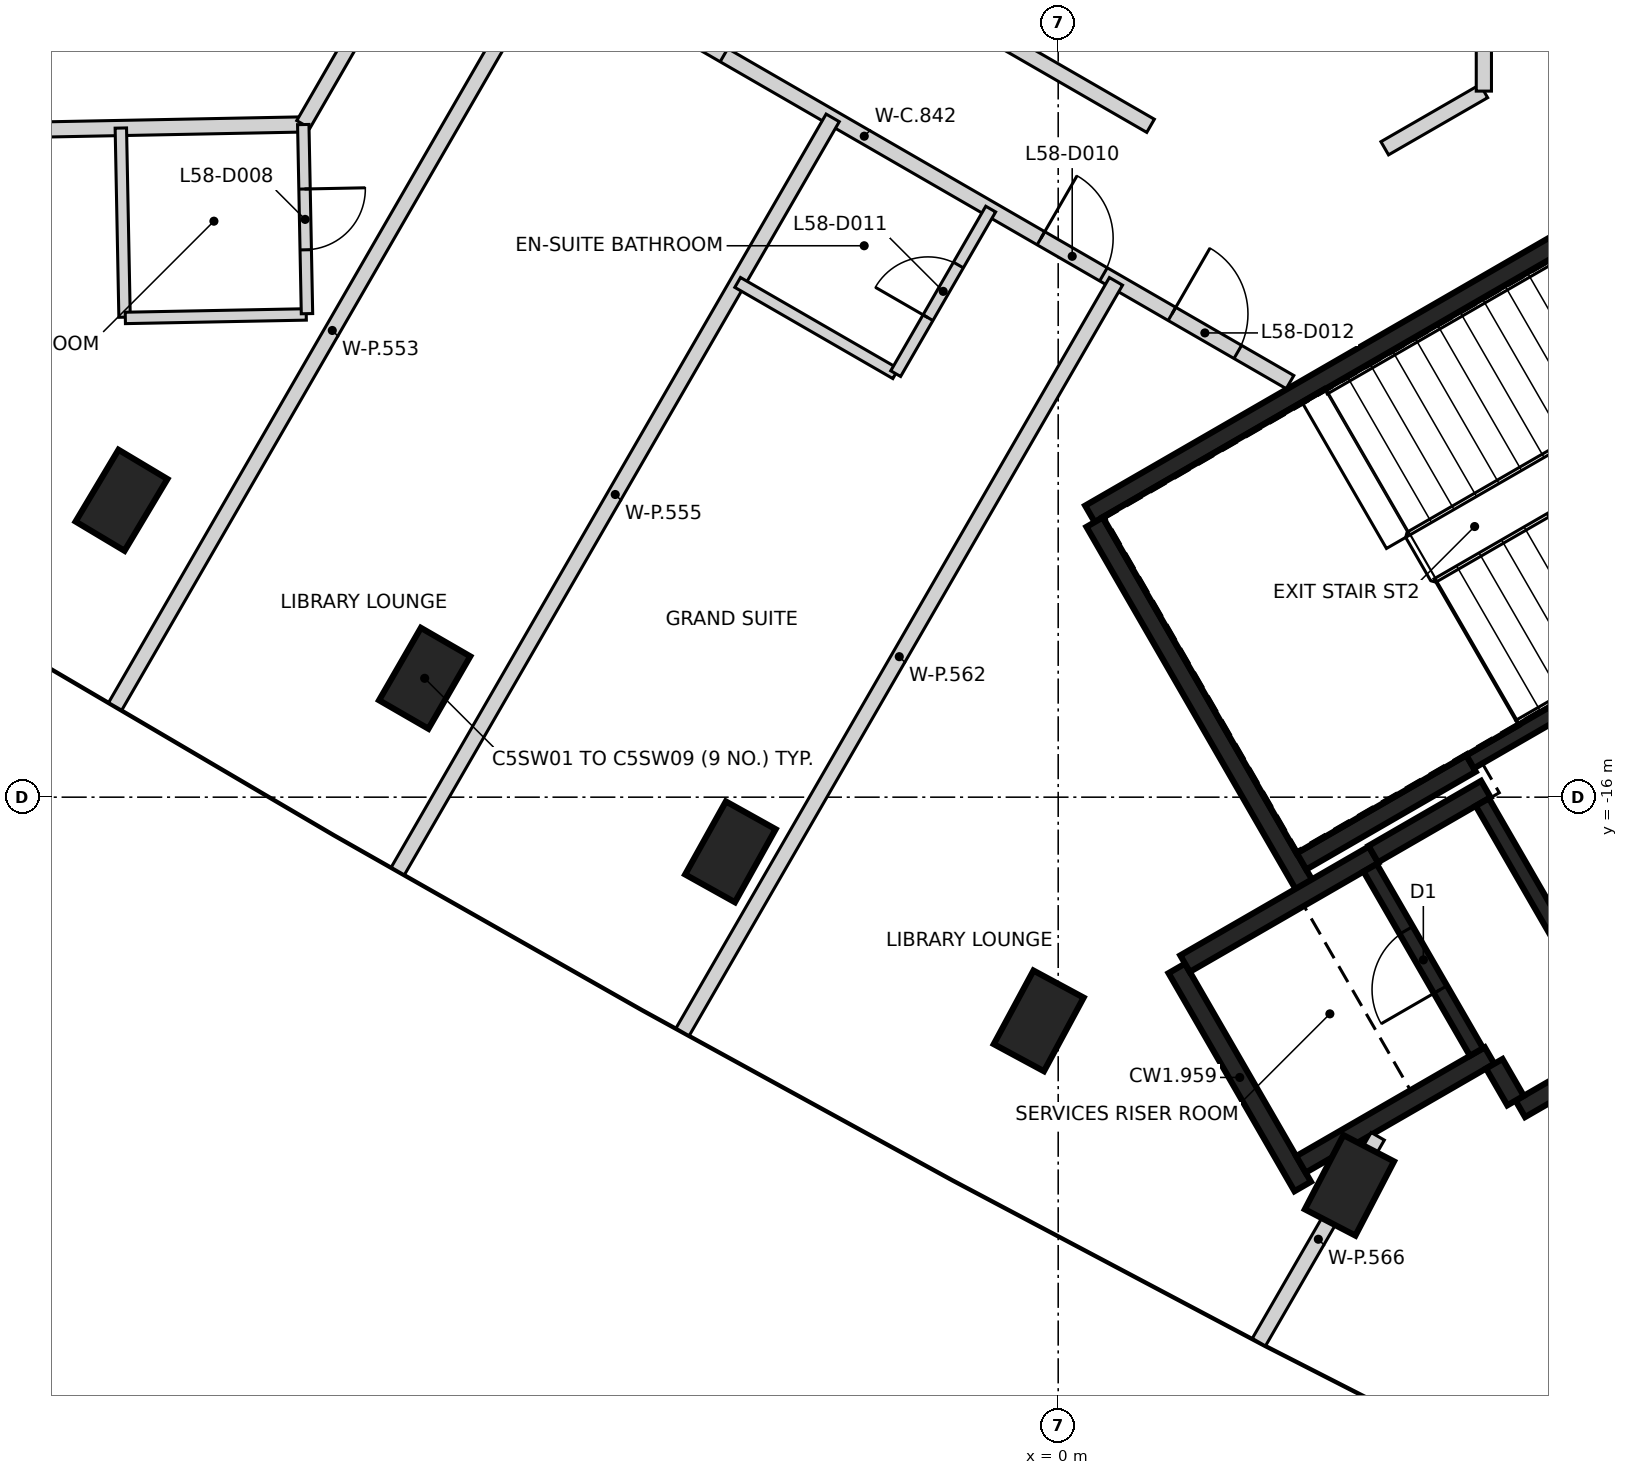
"""IFC4 building model, lengths in metres.
Left out: names, types, materials, properties, quantities, classifications, styles, units other than length and angle.
Written with IfcOpenShell. Run it as: python <this file> out.ifc"""

import sys

from ifc_helpers import new_model, si_unit, direction, frame, frame_2d, origin, origin_2d, place, context, subcontext, project, spatial, rectangle, extrude, element, fill, save


model = new_model("IFC4")
c1 = context("Model", 3, precision=1e-05, world=origin(), true_north=direction((0.0, 1.0)))
c2 = subcontext(c1, "Body", "Model", "MODEL_VIEW")
j1 = project(units=[si_unit("LENGTHUNIT", "METRE"), si_unit("PLANEANGLEUNIT", "RADIAN")], contexts=[c1])
p1 = place(None, origin())
s1 = spatial("IfcSite", under=j1, at=p1, CompositionType="ELEMENT")
p2 = place(p1, origin())
s2 = spatial("IfcBuilding", under=s1, at=p2, CompositionType="ELEMENT")
p3 = place(p2, frame((0.0, 0.0, 232.2)))
s3 = spatial("IfcBuildingStorey", under=s2, at=p3, CompositionType="ELEMENT", Elevation=232.2)
for number, where, z_axis, x_axis in (
    (1, (-12.323, -12.094, -0.35), (0.0, 0.0, 1.0), (0.513, 0.858, 0.0)),
    (2, (-8.335, -14.436, -0.35), (0.0, 0.0, 1.0), (0.5, 0.866, 0.0)),
    (3, (-4.312, -16.719, -0.35), (0.0, 0.0, 1.0), (0.487, 0.873, 0.0)),
    (4, (-0.256, -18.943, -0.35), (0.0, 0.0, 1.0), (0.475, 0.88, 0.0)),
    (5, (3.832, -21.107, -0.35), (0.0, 0.0, 1.0), (0.461, 0.887, 0.0)),
):
    element("IfcColumn", number, at=place(p3, frame(where, z_axis=z_axis, x_axis=x_axis)), inside=s3, PredefinedType="COLUMN", context=c2, shape_type="SweptSolid", body=[
        extrude(rectangle(XDim=1.1, YDim=0.75, at=origin_2d()), origin(), (0.0, 0.0, 1.0), 3.6),
    ])
p4 = place(p3, frame((0.417, -12.273, 0.0), z_axis=(0.0, 0.0, 1.0), x_axis=(0.866021906294, 0.500006057782, 0.0)))
e6 = element("IfcWall", 6, at=p4, inside=s3, PredefinedType="SHEAR", context=c2, shape_type="SweptSolid", body=[
    extrude(rectangle(XDim=11.55, YDim=0.25, at=frame_2d((5.775, 0.0))), origin(), (0.0, 0.0, 1.0), 3.25),
])
p5 = place(p4, frame((10.025, 0.0, 0.0)))
e7 = element("IfcOpeningElement", 7, at=p5, cuts=e6, PredefinedType="OPENING", context=c2, shape_type="SweptSolid", body=[
    extrude(rectangle(XDim=1.2, YDim=2.1, at=frame_2d((0.6, 1.05))), frame((0.0, 0.135, 0.0), z_axis=(0.0, -1.0, 0.0), x_axis=(1.0, 0.0, 0.0)), (0.0, 0.0, 1.0), 0.27),
])
p6 = place(p4, frame((8.725, 0.0, 0.0)))
e8 = element("IfcOpeningElement", 8, at=p6, cuts=e6, PredefinedType="OPENING", context=c2, shape_type="SweptSolid", body=[
    extrude(rectangle(XDim=1.2, YDim=2.1, at=frame_2d((0.6, 1.05))), frame((0.0, 0.135, 0.0), z_axis=(0.0, -1.0, 0.0), x_axis=(1.0, 0.0, 0.0)), (0.0, 0.0, 1.0), 0.27),
])
p7 = place(p3, frame((3.235, -17.153, 0.0), z_axis=(0.0, 0.0, 1.0), x_axis=(-0.500008851346, 0.866020293397, 0.0)))
e9 = element("IfcWall", 9, at=p7, inside=s3, PredefinedType="SHEAR", context=c2, shape_type="SweptSolid", body=[
    extrude(rectangle(XDim=5.51, YDim=0.25, at=frame_2d((2.755, 0.0))), origin(), (0.0, 0.0, 1.0), 3.25),
])
p8 = place(p3, frame((3.217, -21.122, 0.0), z_axis=(0.0, 0.0, 1.0), x_axis=(-0.499998874531, 0.866026053573, 0.0)))
e10 = element("IfcWall", 10, at=p8, inside=s3, PredefinedType="SHEAR", context=c2, shape_type="SweptSolid", body=[
    extrude(rectangle(XDim=3.313, YDim=0.25, at=frame_2d((1.656, 0.0))), origin(), (0.0, 0.0, 1.0), 3.25),
])
p9 = place(p3, frame((1.669, -18.19, 0.0), z_axis=(0.0, 0.0, 1.0), x_axis=(0.866042235819, 0.499970844928, 0.0)))
e11 = element("IfcWall", 11, at=p9, inside=s3, PredefinedType="SHEAR", context=c2, shape_type="SweptSolid", body=[
    extrude(rectangle(XDim=2.865, YDim=0.25, at=frame_2d((1.432, 0.0))), origin(), (0.0, 0.0, 1.0), 3.25),
])
p10 = place(p3, frame((5.675, -19.399, 0.0), z_axis=(0.0, 0.0, 1.0), x_axis=(-0.866026637627, -0.499997862916, 0.0)))
e12 = element("IfcWall", 12, at=p10, inside=s3, PredefinedType="SHEAR", context=c2, shape_type="SweptSolid", body=[
    extrude(rectangle(XDim=2.865, YDim=0.25, at=frame_2d((1.432, 0.0))), origin(), (0.0, 0.0, 1.0), 3.25),
])
p11 = place(p3, frame((5.431, -15.556, 0.0), z_axis=(0.0, 0.0, 1.0), x_axis=(-0.866022940537, -0.500004266446, 0.0)))
e13 = element("IfcWall", 13, at=p11, inside=s3, PredefinedType="SHEAR", context=c2, shape_type="SweptSolid", body=[
    extrude(rectangle(XDim=2.575, YDim=0.25, at=frame_2d((1.287, 0.0))), origin(), (0.0, 0.0, 1.0), 3.25),
])
p12 = place(p3, frame((4.145, -16.749, 0.0), z_axis=(0.0, 0.0, 1.0), x_axis=(0.866038183914, 0.499977863513, 0.0)))
e14 = element("IfcWall", 14, at=p12, inside=s3, PredefinedType="SHEAR", context=c2, shape_type="SweptSolid", body=[
    extrude(rectangle(XDim=1.71, YDim=0.25, at=frame_2d((0.855, 0.0))), origin(), (0.0, 0.0, 1.0), 3.25),
])
p13 = place(p3, frame((7.452, -19.308, 0.0), z_axis=(0.0, 0.0, 1.0), x_axis=(-0.866044474677, -0.49996696679, 0.0)))
e15 = element("IfcWall", 15, at=p13, inside=s3, PredefinedType="SHEAR", context=c2, shape_type="SweptSolid", body=[
    extrude(rectangle(XDim=1.584, YDim=0.25, at=frame_2d((0.792, 0.0))), origin(), (0.0, 0.0, 1.0), 3.25),
])
p14 = place(p3, frame((6.017, -19.992, 0.0), z_axis=(0.0, 0.0, 1.0), x_axis=(-0.500364886717, 0.865814633822, 0.0)))
e16 = element("IfcWall", 16, at=p14, inside=s3, PredefinedType="SHEAR", context=c2, shape_type="SweptSolid", body=[
    extrude(rectangle(XDim=0.559, YDim=0.25, at=frame_2d((0.28, 0.0))), origin(), (0.0, 0.0, 1.0), 3.25),
])
p15 = place(p3, frame((5.419, -15.534, 0.0), z_axis=(0.0, 0.0, 1.0), x_axis=(0.866029065029, 0.499993658486, 0.0)))
e17 = element("IfcWall", 17, at=p15, inside=s3, PredefinedType="SHEAR", context=c2, shape_type="SweptSolid", body=[
    extrude(rectangle(XDim=5.974, YDim=0.2, at=frame_2d((2.987, 0.0))), origin(), (0.0, 0.0, 1.0), 3.25),
])
p16 = place(p3, frame((5.503, -19.352, 0.0), z_axis=(0.0, 0.0, 1.0), x_axis=(-0.499986818241, 0.866033014143, 0.0)))
e18 = element("IfcWall", 18, at=p16, inside=s3, PredefinedType="SHEAR", context=c2, shape_type="SweptSolid", body=[
    extrude(rectangle(XDim=2.798, YDim=0.2, at=frame_2d((1.399, 0.0))), origin(), (0.0, 0.0, 1.0), 3.25),
])
p17 = place(p16, frame((0.949, 0.0, 0.0)))
e19 = element("IfcOpeningElement", 19, at=p17, cuts=e18, PredefinedType="OPENING", context=c2, shape_type="SweptSolid", body=[
    extrude(rectangle(XDim=0.9, YDim=2.1, at=frame_2d((0.45, 1.05))), frame((0.0, 0.11, 0.0), z_axis=(0.0, -1.0, 0.0), x_axis=(1.0, 0.0, 0.0)), (0.0, 0.0, 1.0), 0.22),
])
p18 = place(p3, frame((6.96, -18.455, 0.0), z_axis=(0.0, 0.0, 1.0), x_axis=(-0.499926705758, 0.866067716099, 0.0)))
e20 = element("IfcWall", 20, at=p18, inside=s3, PredefinedType="SHEAR", context=c2, shape_type="SweptSolid", body=[
    extrude(rectangle(XDim=2.759, YDim=0.2, at=frame_2d((1.38, 0.0))), origin(), (0.0, 0.0, 1.0), 3.25),
])
p19 = place(p3, frame((-19.149, -7.329, 0.0), z_axis=(0.0, 0.0, 1.0), x_axis=(0.999810023919, 0.019491435849, 0.0)))
e21 = element("IfcWall", 21, at=p19, inside=s3, PredefinedType="PARTITIONING", context=c2, shape_type="SweptSolid", body=[
    extrude(rectangle(XDim=9.219, YDim=0.2, at=frame_2d((4.609, 0.0))), origin(), (0.0, 0.0, 1.0), 3.25),
])
p20 = place(p19, frame((3.23, 0.0, 0.0)))
e22 = element("IfcOpeningElement", 22, at=p20, cuts=e21, PredefinedType="OPENING", context=c2, shape_type="SweptSolid", body=[
    extrude(rectangle(XDim=0.95, YDim=2.1, at=frame_2d((0.475, 1.05))), frame((0.0, 0.11, 0.0), z_axis=(0.0, -1.0, 0.0), x_axis=(1.0, 0.0, 0.0)), (0.0, 0.0, 1.0), 0.22),
])
p21 = place(p3, frame((-9.931, -7.149, 0.0), z_axis=(0.0, 0.0, 1.0), x_axis=(0.499934418432, 0.86606326401, 0.0)))
e23 = element("IfcWall", 23, at=p21, inside=s3, PredefinedType="PARTITIONING", context=c2, shape_type="SweptSolid", body=[
    extrude(rectangle(XDim=3.556, YDim=0.2, at=frame_2d((1.778, 0.0))), origin(), (0.0, 0.0, 1.0), 3.25),
])
p22 = place(p3, frame((-8.612, -1.494, 0.0), z_axis=(0.0, 0.0, 1.0), x_axis=(0.866035468681, -0.499982566683, 0.0)))
e24 = element("IfcWall", 24, at=p22, inside=s3, PredefinedType="PARTITIONING", context=c2, shape_type="SweptSolid", body=[
    extrude(rectangle(XDim=11.348, YDim=0.2, at=frame_2d((5.674, 0.0))), origin(), (0.0, 0.0, 1.0), 3.25),
])
p23 = place(p22, frame((1.241, 0.0, 0.0)))
e25 = element("IfcOpeningElement", 25, at=p23, cuts=e24, PredefinedType="OPENING", context=c2, shape_type="SweptSolid", body=[
    extrude(rectangle(XDim=0.9, YDim=2.1, at=frame_2d((0.45, 1.05))), frame((0.0, 0.11, 0.0), z_axis=(0.0, -1.0, 0.0), x_axis=(1.0, 0.0, 0.0)), (0.0, 0.0, 1.0), 0.22),
])
p24 = place(p22, frame((6.903, 0.0, 0.0)))
e26 = element("IfcOpeningElement", 26, at=p24, cuts=e24, PredefinedType="OPENING", context=c2, shape_type="SweptSolid", body=[
    extrude(rectangle(XDim=0.9, YDim=2.1, at=frame_2d((0.45, 1.05))), frame((0.0, 0.11, 0.0), z_axis=(0.0, -1.0, 0.0), x_axis=(1.0, 0.0, 0.0)), (0.0, 0.0, 1.0), 0.22),
])
p25 = place(p3, frame((-8.153, -4.069, 0.0), z_axis=(0.0, 0.0, 1.0), x_axis=(0.865955522833, -0.500121017829, 0.0)))
e27 = element("IfcWall", 27, at=p25, inside=s3, PredefinedType="PARTITIONING", context=c2, shape_type="SweptSolid", body=[
    extrude(rectangle(XDim=12.937, YDim=0.2, at=frame_2d((6.469, 0.0))), origin(), (0.0, 0.0, 1.0), 3.25),
])
p26 = place(p25, frame((3.337, 0.0, 0.0)))
e28 = element("IfcOpeningElement", 28, at=p26, cuts=e27, PredefinedType="OPENING", context=c2, shape_type="SweptSolid", body=[
    extrude(rectangle(XDim=1.0, YDim=2.1, at=frame_2d((0.5, 1.05))), frame((0.0, 0.11, 0.0), z_axis=(0.0, -1.0, 0.0), x_axis=(1.0, 0.0, 0.0)), (0.0, 0.0, 1.0), 0.22),
])
p27 = place(p25, frame((9.153, 0.0, 0.0)))
e29 = element("IfcOpeningElement", 29, at=p27, cuts=e27, PredefinedType="OPENING", context=c2, shape_type="SweptSolid", body=[
    extrude(rectangle(XDim=0.95, YDim=2.1, at=frame_2d((0.475, 1.05))), frame((0.0, 0.11, 0.0), z_axis=(0.0, -1.0, 0.0), x_axis=(1.0, 0.0, 0.0)), (0.0, 0.0, 1.0), 0.22),
])
p28 = place(p25, frame((11.144, 0.0, 0.0)))
e30 = element("IfcOpeningElement", 30, at=p28, cuts=e27, PredefinedType="OPENING", context=c2, shape_type="SweptSolid", body=[
    extrude(rectangle(XDim=1.0, YDim=2.1, at=frame_2d((0.5, 1.05))), frame((0.0, 0.11, 0.0), z_axis=(0.0, -1.0, 0.0), x_axis=(1.0, 0.0, 0.0)), (0.0, 0.0, 1.0), 0.22),
])
p29 = place(p3, frame((4.296, -7.463, 0.0), z_axis=(0.0, 0.0, 1.0), x_axis=(0.86632054743, 0.499488447414, 0.0)))
e31 = element("IfcWall", 31, at=p29, inside=s3, PredefinedType="PARTITIONING", context=c2, shape_type="SweptSolid", body=[
    extrude(rectangle(XDim=1.505, YDim=0.2, at=frame_2d((0.753, 0.0))), origin(), (0.0, 0.0, 1.0), 3.25),
])
p30 = place(p3, frame((5.6, -6.711, 0.0), z_axis=(0.0, 0.0, 1.0), x_axis=(0.0, 1.0, 0.0)))
e32 = element("IfcWall", 32, at=p30, inside=s3, PredefinedType="PARTITIONING", context=c2, shape_type="SweptSolid", body=[
    extrude(rectangle(XDim=13.422, YDim=0.2, at=frame_2d((6.711, 0.0))), origin(), (0.0, 0.0, 1.0), 3.25),
])
p31 = place(p30, frame((2.912, 0.0, 0.0)))
e33 = element("IfcOpeningElement", 33, at=p31, cuts=e32, PredefinedType="OPENING", context=c2, shape_type="SweptSolid", body=[
    extrude(rectangle(XDim=0.9, YDim=2.1, at=frame_2d((0.45, 1.05))), frame((0.0, 0.11, 0.0), z_axis=(0.0, -1.0, 0.0), x_axis=(1.0, 0.0, 0.0)), (0.0, 0.0, 1.0), 0.22),
])
p32 = place(p30, frame((9.611, 0.0, 0.0)))
e34 = element("IfcOpeningElement", 34, at=p32, cuts=e32, PredefinedType="OPENING", context=c2, shape_type="SweptSolid", body=[
    extrude(rectangle(XDim=0.9, YDim=2.1, at=frame_2d((0.45, 1.05))), frame((0.0, 0.11, 0.0), z_axis=(0.0, -1.0, 0.0), x_axis=(1.0, 0.0, 0.0)), (0.0, 0.0, 1.0), 0.22),
])
p33 = place(p3, frame((-12.407, -14.806, 0.0), z_axis=(0.0, 0.0, 1.0), x_axis=(0.500104175471, 0.865965249693, 0.0)))
e35 = element("IfcWall", 35, at=p33, inside=s3, PredefinedType="PARTITIONING", context=c2, shape_type="SweptSolid", body=[
    extrude(rectangle(XDim=11.423, YDim=0.2, at=frame_2d((5.711, 0.0))), origin(), (0.0, 0.0, 1.0), 2.35),
])
p34 = place(p3, frame((-8.688, -16.973, 0.0), z_axis=(0.0, 0.0, 1.0), x_axis=(0.500021643343, 0.866012907634, 0.0)))
e36 = element("IfcWall", 36, at=p34, inside=s3, PredefinedType="PARTITIONING", context=c2, shape_type="SweptSolid", body=[
    extrude(rectangle(XDim=11.443, YDim=0.2, at=frame_2d((5.721, 0.0))), origin(), (0.0, 0.0, 1.0), 2.35),
])
p35 = place(p3, frame((-4.942, -19.089, 0.0), z_axis=(0.0, 0.0, 1.0), x_axis=(0.500021458202, 0.866013014531, 0.0)))
e37 = element("IfcWall", 37, at=p35, inside=s3, PredefinedType="PARTITIONING", context=c2, shape_type="SweptSolid", body=[
    extrude(rectangle(XDim=11.403, YDim=0.2, at=frame_2d((5.701, 0.0))), origin(), (0.0, 0.0, 1.0), 2.35),
])
p36 = place(p3, frame((2.64, -23.17, 0.0), z_axis=(0.0, 0.0, 1.0), x_axis=(0.500017489778, 0.866015305821, 0.0)))
e38 = element("IfcWall", 38, at=p36, inside=s3, PredefinedType="PARTITIONING", context=c2, shape_type="SweptSolid", body=[
    extrude(rectangle(XDim=3.128, YDim=0.2, at=frame_2d((1.564, 0.0))), origin(), (0.0, 0.0, 1.0), 3.25),
])
p37 = place(p3, frame((-12.332, -7.197, 0.0), z_axis=(0.0, 0.0, 1.0), x_axis=(0.019719450113, -0.999805552739, 0.0)))
e39 = element("IfcWall", 39, at=p37, inside=s3, PredefinedType="PARTITIONING", context=c2, shape_type="SweptSolid", body=[
    extrude(rectangle(XDim=2.489, YDim=0.15, at=frame_2d((1.244, 0.0))), origin(), (0.0, 0.0, 1.0), 3.25),
])
p38 = place(p3, frame((-12.273, -9.695, 0.0), z_axis=(0.0, 0.0, 1.0), x_axis=(0.999812094216, 0.019384949303, 0.0)))
e40 = element("IfcWall", 40, at=p38, inside=s3, PredefinedType="PARTITIONING", context=c2, shape_type="SweptSolid", body=[
    extrude(rectangle(XDim=2.38, YDim=0.15, at=frame_2d((1.19, 0.0))), origin(), (0.0, 0.0, 1.0), 3.25),
])
p39 = place(p3, frame((-9.932, -7.151, 0.0), z_axis=(0.0, 0.0, 1.0), x_axis=(0.019621381261, -0.999807482167, 0.0)))
e41 = element("IfcWall", 41, at=p39, inside=s3, PredefinedType="PARTITIONING", context=c2, shape_type="SweptSolid", body=[
    extrude(rectangle(XDim=2.489, YDim=0.15, at=frame_2d((1.244, 0.0))), origin(), (0.0, 0.0, 1.0), 3.25),
])
p40 = place(p39, frame((0.848, 0.0, 0.0)))
e42 = element("IfcOpeningElement", 42, at=p40, cuts=e41, PredefinedType="OPENING", context=c2, shape_type="SweptSolid", body=[
    extrude(rectangle(XDim=0.8, YDim=2.1, at=frame_2d((0.4, 1.05))), frame((0.0, 0.085, 0.0), z_axis=(0.0, -1.0, 0.0), x_axis=(1.0, 0.0, 0.0)), (0.0, 0.0, 1.0), 0.17),
])
p41 = place(p3, frame((-4.217, -9.228, 0.0), z_axis=(0.0, 0.0, 1.0), x_axis=(0.866100915363, -0.499869187296, 0.0)))
e43 = element("IfcWall", 43, at=p41, inside=s3, PredefinedType="PARTITIONING", context=c2, shape_type="SweptSolid", body=[
    extrude(rectangle(XDim=2.401, YDim=0.15, at=frame_2d((1.2, 0.0))), origin(), (0.0, 0.0, 1.0), 3.25),
])
p42 = place(p3, frame((-2.138, -10.428, 0.0), z_axis=(0.0, 0.0, 1.0), x_axis=(0.500004234368, 0.866022959057, 0.0)))
e44 = element("IfcWall", 44, at=p42, inside=s3, PredefinedType="PARTITIONING", context=c2, shape_type="SweptSolid", body=[
    extrude(rectangle(XDim=2.5, YDim=0.15, at=frame_2d((1.25, 0.0))), origin(), (0.0, 0.0, 1.0), 3.25),
])
p43 = place(p42, frame((0.85, 0.0, 0.0)))
e45 = element("IfcOpeningElement", 45, at=p43, cuts=e44, PredefinedType="OPENING", context=c2, shape_type="SweptSolid", body=[
    extrude(rectangle(XDim=0.8, YDim=2.1, at=frame_2d((0.4, 1.05))), frame((0.0, 0.085, 0.0), z_axis=(0.0, -1.0, 0.0), x_axis=(1.0, 0.0, 0.0)), (0.0, 0.0, 1.0), 0.17),
])
p44 = place(p17, origin())
e46 = element("IfcDoor", 46, at=p44, inside=s3, OperationType="SINGLE_SWING_RIGHT", PredefinedType="DOOR", context=c2, shape_type="SweptSolid", body=[
    extrude(rectangle(XDim=0.9, YDim=2.1, at=frame_2d((0.45, 1.05))), frame((0.0, 0.025, 0.0), z_axis=(0.0, -1.0, 0.0), x_axis=(1.0, 0.0, 0.0)), (0.0, 0.0, 1.0), 0.05),
])
fill(e19, e46)
p45 = place(p40, frame((0.8, 0.0, 0.0), z_axis=(0.0, 0.0, 1.0), x_axis=(-1.0, 0.0, 0.0)))
e47 = element("IfcDoor", 47, at=p45, inside=s3, OperationType="SINGLE_SWING_LEFT", PredefinedType="DOOR", context=c2, shape_type="SweptSolid", body=[
    extrude(rectangle(XDim=0.8, YDim=2.1, at=frame_2d((0.4, 1.05))), frame((0.0, 0.025, 0.0), z_axis=(0.0, -1.0, 0.0), x_axis=(1.0, 0.0, 0.0)), (0.0, 0.0, 1.0), 0.05),
])
fill(e42, e47)
p46 = place(p26, frame((1.0, 0.0, 0.0), z_axis=(0.0, 0.0, 1.0), x_axis=(-1.0, 0.0, 0.0)))
e48 = element("IfcDoor", 48, at=p46, inside=s3, OperationType="SINGLE_SWING_LEFT", PredefinedType="DOOR", context=c2, shape_type="SweptSolid", body=[
    extrude(rectangle(XDim=1.0, YDim=2.1, at=frame_2d((0.5, 1.05))), frame((0.0, 0.025, 0.0), z_axis=(0.0, -1.0, 0.0), x_axis=(1.0, 0.0, 0.0)), (0.0, 0.0, 1.0), 0.05),
])
fill(e28, e48)
p47 = place(p27, frame((0.95, 0.0, 0.0), z_axis=(0.0, 0.0, 1.0), x_axis=(-1.0, 0.0, 0.0)))
e49 = element("IfcDoor", 49, at=p47, inside=s3, OperationType="SINGLE_SWING_LEFT", PredefinedType="DOOR", context=c2, shape_type="SweptSolid", body=[
    extrude(rectangle(XDim=0.95, YDim=2.1, at=frame_2d((0.475, 1.05))), frame((0.0, 0.025, 0.0), z_axis=(0.0, -1.0, 0.0), x_axis=(1.0, 0.0, 0.0)), (0.0, 0.0, 1.0), 0.05),
])
fill(e29, e49)
p48 = place(p43, origin())
e50 = element("IfcDoor", 50, at=p48, inside=s3, OperationType="SINGLE_SWING_LEFT", PredefinedType="DOOR", context=c2, shape_type="SweptSolid", body=[
    extrude(rectangle(XDim=0.8, YDim=2.1, at=frame_2d((0.4, 1.05))), frame((0.0, 0.025, 0.0), z_axis=(0.0, -1.0, 0.0), x_axis=(1.0, 0.0, 0.0)), (0.0, 0.0, 1.0), 0.05),
])
fill(e45, e50)
p49 = place(p28, frame((1.0, 0.0, 0.0), z_axis=(0.0, 0.0, 1.0), x_axis=(-1.0, 0.0, 0.0)))
e51 = element("IfcDoor", 51, at=p49, inside=s3, OperationType="SINGLE_SWING_LEFT", PredefinedType="DOOR", context=c2, shape_type="SweptSolid", body=[
    extrude(rectangle(XDim=1.0, YDim=2.1, at=frame_2d((0.5, 1.05))), frame((0.0, 0.025, 0.0), z_axis=(0.0, -1.0, 0.0), x_axis=(1.0, 0.0, 0.0)), (0.0, 0.0, 1.0), 0.05),
])
fill(e30, e51)
save(model, sys.argv[1])
